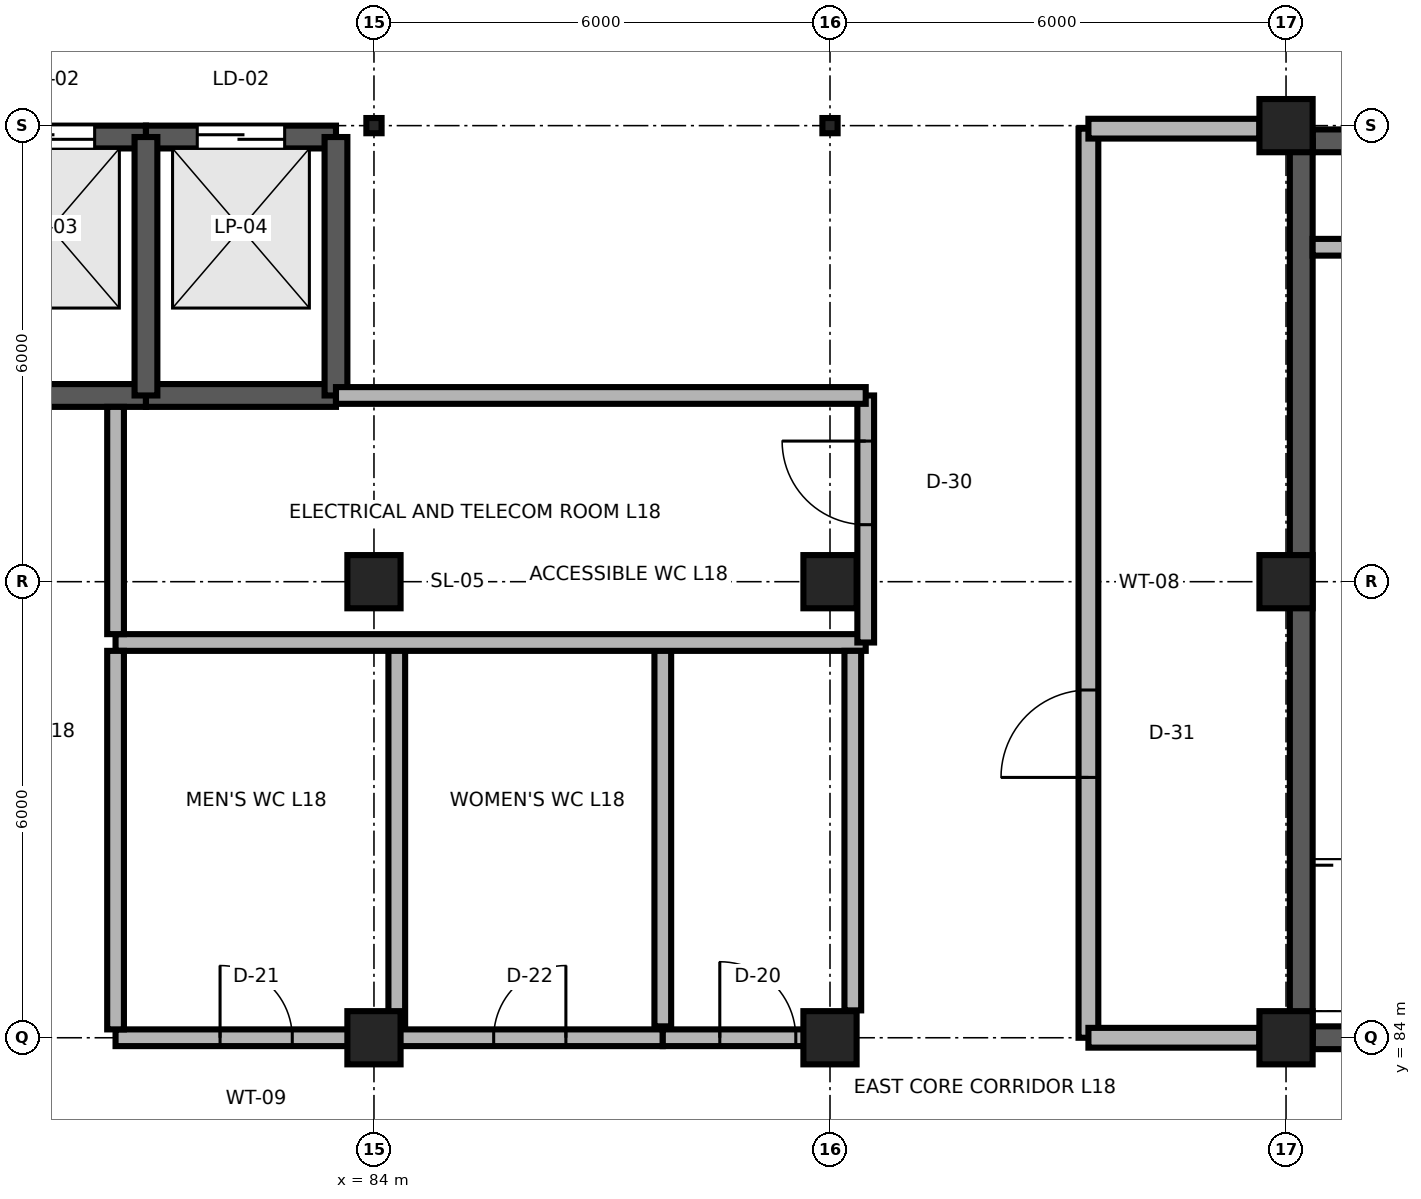
"""IFC4 building model, lengths in metres.
Left out: names, types, materials, properties, quantities, classifications, styles, units other than length and angle.
Written with IfcOpenShell. Run it as: python <this file> out.ifc"""

import sys

from ifc_helpers import new_model, si_unit, direction, frame, frame_2d, origin, origin_2d, place, context, subcontext, project, spatial, rectangle, i_section, extrude, element, fill, save


model = new_model("IFC4")
c1 = context("Model", 3, precision=1e-05, world=origin(), true_north=direction((0.0, 1.0)))
c2 = subcontext(c1, "Body", "Model", "MODEL_VIEW")
j1 = project(units=[si_unit("LENGTHUNIT", "METRE"), si_unit("PLANEANGLEUNIT", "RADIAN")], contexts=[c1])
p1 = place(None, origin())
s1 = spatial("IfcSite", under=j1, at=p1, CompositionType="ELEMENT")
p2 = place(p1, origin())
s2 = spatial("IfcBuilding", under=s1, at=p2, CompositionType="ELEMENT")
p3 = place(p2, frame((0.0, 0.0, 72.0)))
s3 = spatial("IfcBuildingStorey", under=s2, at=p3, CompositionType="ELEMENT", Elevation=72.0)
for number, where, z_axis, x_axis in (
    (1, (84.0, 84.0, 0.0), (0.0, 0.0, 1.0), (1.0, 0.0, 0.0)),
    (2, (90.0, 84.0, 0.0), (0.0, 0.0, 1.0), (1.0, 0.0, 0.0)),
    (3, (96.0, 84.0, 0.0), (0.0, 0.0, 1.0), (1.0, 0.0, 0.0)),
    (4, (84.0, 90.0, 0.0), (0.0, 0.0, 1.0), (1.0, 0.0, 0.0)),
    (5, (90.0, 90.0, 0.0), (0.0, 0.0, 1.0), (1.0, 0.0, 0.0)),
    (6, (96.0, 90.0, 0.0), (0.0, 0.0, 1.0), (1.0, 0.0, 0.0)),
):
    element("IfcColumn", number, at=place(p3, frame(where, z_axis=z_axis, x_axis=x_axis)), inside=s3, PredefinedType="COLUMN", context=c2, shape_type="SweptSolid", body=[
        extrude(rectangle(XDim=0.7, YDim=0.7, at=origin_2d()), origin(), (0.0, 0.0, 1.0), 4.3),
    ])
for number, where, z_axis, x_axis in (
    (7, (84.0, 96.0, 0.0), (0.0, 0.0, 1.0), (1.0, 0.0, 0.0)),
    (8, (90.0, 96.0, 0.0), (0.0, 0.0, 1.0), (1.0, 0.0, 0.0)),
):
    element("IfcColumn", number, at=place(p3, frame(where, z_axis=z_axis, x_axis=x_axis)), inside=s3, PredefinedType="COLUMN", context=c2, shape_type="SweptSolid", body=[
        extrude(i_section(OverallWidth=0.2, OverallDepth=0.2, WebThickness=0.008, FlangeThickness=0.012, FilletRadius=0.013, at=origin_2d()), origin(), (0.0, 0.0, 1.0), 4.3),
    ])
p4 = place(p3, frame((96.0, 96.0, 0.0), z_axis=(0.0, 0.0, 1.0), x_axis=(1.0, 0.0, 0.0)))
e9 = element("IfcColumn", 9, at=p4, inside=s3, PredefinedType="COLUMN", context=c2, shape_type="SweptSolid", body=[
    extrude(rectangle(XDim=0.7, YDim=0.7, at=origin_2d()), origin(), (0.0, 0.0, 1.0), 4.3),
])
p5 = place(p3, frame((96.35, 84.0, 0.0), z_axis=(0.0, 0.0, 1.0), x_axis=(1.0, 0.0, 0.0)))
e10 = element("IfcWall", 10, at=p5, inside=s3, PredefinedType="SHEAR", context=c2, shape_type="SweptSolid", body=[
    extrude(rectangle(XDim=5.3, YDim=0.3, at=frame_2d((2.65, 0.0))), origin(), (0.0, 0.0, 1.0), 4.3),
])
p6 = place(p5, frame((1.975, 0.0, 0.0)))
e11 = element("IfcOpeningElement", 11, at=p6, cuts=e10, PredefinedType="OPENING", context=c2, shape_type="SweptSolid", body=[
    extrude(rectangle(XDim=1.35, YDim=2.2, at=frame_2d((0.675, 1.1))), frame((0.0, 0.165, 0.0), z_axis=(0.0, -1.0, 0.0), x_axis=(1.0, 0.0, 0.0)), (0.0, 0.0, 1.0), 0.33),
])
p7 = place(p3, frame((96.35, 95.8, 0.0), z_axis=(0.0, 0.0, 1.0), x_axis=(1.0, 0.0, 0.0)))
e12 = element("IfcWall", 12, at=p7, inside=s3, PredefinedType="SHEAR", context=c2, shape_type="SweptSolid", body=[
    extrude(rectangle(XDim=5.3, YDim=0.3, at=frame_2d((2.65, 0.0))), origin(), (0.0, 0.0, 1.0), 4.3),
])
p8 = place(p3, frame((96.2, 84.0, 0.0), z_axis=(0.0, 0.0, 1.0), x_axis=(0.0, 1.0, 0.0)))
e13 = element("IfcWall", 13, at=p8, inside=s3, PredefinedType="SHEAR", context=c2, shape_type="SweptSolid", body=[
    extrude(rectangle(XDim=11.8, YDim=0.3, at=frame_2d((5.9, 0.0))), origin(), (0.0, 0.0, 1.0), 4.3),
])
p9 = place(p3, frame((96.35, 94.4, 0.0), z_axis=(0.0, 0.0, 1.0), x_axis=(1.0, 0.0, 0.0)))
e14 = element("IfcWall", 14, at=p9, inside=s3, PredefinedType="PARTITIONING", context=c2, shape_type="SweptSolid", body=[
    extrude(rectangle(XDim=1.1, YDim=0.22, at=frame_2d((0.55, 0.0))), origin(), (0.0, 0.0, 1.0), 4.3),
])
p10 = place(p3, frame((78.5, 95.85, 0.0), z_axis=(0.0, 0.0, 1.0), x_axis=(1.0, 0.0, 0.0)))
e15 = element("IfcWall", 15, at=p10, inside=s3, PredefinedType="SHEAR", context=c2, shape_type="SweptSolid", body=[
    extrude(rectangle(XDim=2.5, YDim=0.3, at=frame_2d((1.25, 0.0))), origin(), (0.0, 0.0, 1.0), 4.3),
])
p11 = place(p10, frame((0.675, 0.0, 0.0)))
e16 = element("IfcOpeningElement", 16, at=p11, cuts=e15, PredefinedType="OPENING", context=c2, shape_type="SweptSolid", body=[
    extrude(rectangle(XDim=1.15, YDim=2.15, at=frame_2d((0.575, 1.075))), frame((0.0, 0.165, 0.0), z_axis=(0.0, -1.0, 0.0), x_axis=(1.0, 0.0, 0.0)), (0.0, 0.0, 1.0), 0.33),
])
p12 = place(p3, frame((78.5, 92.45, 0.0), z_axis=(0.0, 0.0, 1.0), x_axis=(1.0, 0.0, 0.0)))
e17 = element("IfcWall", 17, at=p12, inside=s3, PredefinedType="SHEAR", context=c2, shape_type="SweptSolid", body=[
    extrude(rectangle(XDim=2.5, YDim=0.3, at=frame_2d((1.25, 0.0))), origin(), (0.0, 0.0, 1.0), 4.3),
])
p13 = place(p3, frame((81.0, 95.85, 0.0), z_axis=(0.0, 0.0, 1.0), x_axis=(1.0, 0.0, 0.0)))
e18 = element("IfcWall", 18, at=p13, inside=s3, PredefinedType="SHEAR", context=c2, shape_type="SweptSolid", body=[
    extrude(rectangle(XDim=2.5, YDim=0.3, at=frame_2d((1.25, 0.0))), origin(), (0.0, 0.0, 1.0), 4.3),
])
p14 = place(p13, frame((0.675, 0.0, 0.0)))
e19 = element("IfcOpeningElement", 19, at=p14, cuts=e18, PredefinedType="OPENING", context=c2, shape_type="SweptSolid", body=[
    extrude(rectangle(XDim=1.15, YDim=2.15, at=frame_2d((0.575, 1.075))), frame((0.0, 0.165, 0.0), z_axis=(0.0, -1.0, 0.0), x_axis=(1.0, 0.0, 0.0)), (0.0, 0.0, 1.0), 0.33),
])
p15 = place(p3, frame((81.0, 92.45, 0.0), z_axis=(0.0, 0.0, 1.0), x_axis=(1.0, 0.0, 0.0)))
e20 = element("IfcWall", 20, at=p15, inside=s3, PredefinedType="SHEAR", context=c2, shape_type="SweptSolid", body=[
    extrude(rectangle(XDim=2.5, YDim=0.3, at=frame_2d((1.25, 0.0))), origin(), (0.0, 0.0, 1.0), 4.3),
])
for number, where, z_axis, x_axis in (
    (21, (81.0, 92.45, 0.0), (0.0, 0.0, 1.0), (0.0, 1.0, 0.0)),
    (22, (83.5, 92.45, 0.0), (0.0, 0.0, 1.0), (0.0, 1.0, 0.0)),
):
    element("IfcWall", number, at=place(p3, frame(where, z_axis=z_axis, x_axis=x_axis)), inside=s3, PredefinedType="SHEAR", context=c2, shape_type="SweptSolid", body=[
        extrude(rectangle(XDim=3.4, YDim=0.3, at=frame_2d((1.7, 0.0))), origin(), (0.0, 0.0, 1.0), 4.3),
    ])
p16 = place(p3, frame((93.4, 84.0, 0.0), z_axis=(0.0, 0.0, 1.0), x_axis=(0.0, 1.0, 0.0)))
e23 = element("IfcWall", 23, at=p16, inside=s3, PredefinedType="PARTITIONING", context=c2, shape_type="SweptSolid", body=[
    extrude(rectangle(XDim=11.96, YDim=0.26, at=frame_2d((5.98, 0.0))), origin(), (0.0, 0.0, 1.0), 4.3),
])
p17 = place(p16, frame((3.425, 0.0, 0.0)))
e24 = element("IfcOpeningElement", 24, at=p17, cuts=e23, PredefinedType="OPENING", context=c2, shape_type="SweptSolid", body=[
    extrude(rectangle(XDim=1.15, YDim=2.2, at=frame_2d((0.575, 1.1))), frame((0.0, 0.145, 0.0), z_axis=(0.0, -1.0, 0.0), x_axis=(1.0, 0.0, 0.0)), (0.0, 0.0, 1.0), 0.29),
])
for number, where, z_axis, x_axis in (
    (25, (93.4, 84.0, 0.0), (0.0, 0.0, 1.0), (1.0, 0.0, 0.0)),
    (26, (93.4, 95.96, 0.0), (0.0, 0.0, 1.0), (1.0, 0.0, 0.0)),
):
    element("IfcWall", number, at=place(p3, frame(where, z_axis=z_axis, x_axis=x_axis)), inside=s3, PredefinedType="PARTITIONING", context=c2, shape_type="SweptSolid", body=[
        extrude(rectangle(XDim=2.25, YDim=0.26, at=frame_2d((1.125, 0.0))), origin(), (0.0, 0.0, 1.0), 4.056),
    ])
p18 = place(p3, frame((80.6, 84.0, 0.0), z_axis=(0.0, 0.0, 1.0), x_axis=(1.0, 0.0, 0.0)))
e27 = element("IfcWall", 27, at=p18, inside=s3, PredefinedType="PARTITIONING", context=c2, shape_type="SweptSolid", body=[
    extrude(rectangle(XDim=3.7, YDim=0.22, at=frame_2d((1.85, 0.0))), origin(), (0.0, 0.0, 1.0), 4.056),
])
p19 = place(p18, frame((1.375, 0.0, 0.0)))
e28 = element("IfcOpeningElement", 28, at=p19, cuts=e27, PredefinedType="OPENING", context=c2, shape_type="SweptSolid", body=[
    extrude(rectangle(XDim=0.95, YDim=2.15, at=frame_2d((0.475, 1.075))), frame((0.0, 0.125, 0.0), z_axis=(0.0, -1.0, 0.0), x_axis=(1.0, 0.0, 0.0)), (0.0, 0.0, 1.0), 0.25),
])
p20 = place(p3, frame((84.3, 84.0, 0.0), z_axis=(0.0, 0.0, 1.0), x_axis=(1.0, 0.0, 0.0)))
e29 = element("IfcWall", 29, at=p20, inside=s3, PredefinedType="PARTITIONING", context=c2, shape_type="SweptSolid", body=[
    extrude(rectangle(XDim=3.5, YDim=0.22, at=frame_2d((1.75, 0.0))), origin(), (0.0, 0.0, 1.0), 4.056),
])
p21 = place(p20, frame((1.275, 0.0, 0.0)))
e30 = element("IfcOpeningElement", 30, at=p21, cuts=e29, PredefinedType="OPENING", context=c2, shape_type="SweptSolid", body=[
    extrude(rectangle(XDim=0.95, YDim=2.1, at=frame_2d((0.475, 1.05))), frame((0.0, 0.125, 0.0), z_axis=(0.0, -1.0, 0.0), x_axis=(1.0, 0.0, 0.0)), (0.0, 0.0, 1.0), 0.25),
])
p22 = place(p3, frame((87.8, 84.0, 0.0), z_axis=(0.0, 0.0, 1.0), x_axis=(1.0, 0.0, 0.0)))
e31 = element("IfcWall", 31, at=p22, inside=s3, PredefinedType="PARTITIONING", context=c2, shape_type="SweptSolid", body=[
    extrude(rectangle(XDim=2.5, YDim=0.22, at=frame_2d((1.25, 0.0))), origin(), (0.0, 0.0, 1.0), 4.056),
])
p23 = place(p22, frame((0.75, 0.0, 0.0)))
e32 = element("IfcOpeningElement", 32, at=p23, cuts=e31, PredefinedType="OPENING", context=c2, shape_type="SweptSolid", body=[
    extrude(rectangle(XDim=1.0, YDim=2.15, at=frame_2d((0.5, 1.075))), frame((0.0, 0.125, 0.0), z_axis=(0.0, -1.0, 0.0), x_axis=(1.0, 0.0, 0.0)), (0.0, 0.0, 1.0), 0.25),
])
for number, where, z_axis, x_axis in (
    (33, (84.3, 84.15, 0.0), (0.0, 0.0, 1.0), (0.0, 1.0, 0.0)),
    (34, (87.8, 84.15, 0.0), (0.0, 0.0, 1.0), (0.0, 1.0, 0.0)),
):
    element("IfcWall", number, at=place(p3, frame(where, z_axis=z_axis, x_axis=x_axis)), inside=s3, PredefinedType="PARTITIONING", context=c2, shape_type="SweptSolid", body=[
        extrude(rectangle(XDim=5.0, YDim=0.22, at=frame_2d((2.5, 0.0))), origin(), (0.0, 0.0, 1.0), 4.3),
    ])
p24 = place(p3, frame((80.6, 89.2, 0.0), z_axis=(0.0, 0.0, 1.0), x_axis=(1.0, 0.0, 0.0)))
e35 = element("IfcWall", 35, at=p24, inside=s3, PredefinedType="PARTITIONING", context=c2, shape_type="SweptSolid", body=[
    extrude(rectangle(XDim=9.87, YDim=0.22, at=frame_2d((4.935, 0.0))), origin(), (0.0, 0.0, 1.0), 4.3),
])
p25 = place(p3, frame((90.47, 89.2, 0.0), z_axis=(0.0, 0.0, 1.0), x_axis=(0.0, 1.0, 0.0)))
e36 = element("IfcWall", 36, at=p25, inside=s3, PredefinedType="PARTITIONING", context=c2, shape_type="SweptSolid", body=[
    extrude(rectangle(XDim=3.25, YDim=0.22, at=frame_2d((1.625, 0.0))), origin(), (0.0, 0.0, 1.0), 4.3),
])
p26 = place(p25, frame((1.55, 0.0, 0.0)))
e37 = element("IfcOpeningElement", 37, at=p26, cuts=e36, PredefinedType="OPENING", context=c2, shape_type="SweptSolid", body=[
    extrude(rectangle(XDim=1.1, YDim=2.15, at=frame_2d((0.55, 1.075))), frame((0.0, 0.125, 0.0), z_axis=(0.0, -1.0, 0.0), x_axis=(1.0, 0.0, 0.0)), (0.0, 0.0, 1.0), 0.25),
])
p27 = place(p3, frame((80.6, 84.11, 0.0), z_axis=(0.0, 0.0, 1.0), x_axis=(0.0, 1.0, 0.0)))
e38 = element("IfcWall", 38, at=p27, inside=s3, PredefinedType="PARTITIONING", context=c2, shape_type="SweptSolid", body=[
    extrude(rectangle(XDim=4.98, YDim=0.22, at=frame_2d((2.49, 0.0))), origin(), (0.0, 0.0, 1.0), 4.3),
])
p28 = place(p3, frame((90.3, 84.36, 0.0), z_axis=(0.0, 0.0, 1.0), x_axis=(0.0, 1.0, 0.0)))
e39 = element("IfcWall", 39, at=p28, inside=s3, PredefinedType="PARTITIONING", context=c2, shape_type="SweptSolid", body=[
    extrude(rectangle(XDim=4.73, YDim=0.22, at=frame_2d((2.365, 0.0))), origin(), (0.0, 0.0, 1.0), 4.3),
])
p29 = place(p3, frame((80.6, 89.31, 0.0), z_axis=(0.0, 0.0, 1.0), x_axis=(0.0, 1.0, 0.0)))
e40 = element("IfcWall", 40, at=p29, inside=s3, PredefinedType="PARTITIONING", context=c2, shape_type="SweptSolid", body=[
    extrude(rectangle(XDim=2.99, YDim=0.22, at=frame_2d((1.495, 0.0))), origin(), (0.0, 0.0, 1.0), 4.3),
])
p30 = place(p3, frame((83.5, 92.45, 0.0), z_axis=(0.0, 0.0, 1.0), x_axis=(1.0, 0.0, 0.0)))
e41 = element("IfcWall", 41, at=p30, inside=s3, PredefinedType="PARTITIONING", context=c2, shape_type="SweptSolid", body=[
    extrude(rectangle(XDim=6.97, YDim=0.22, at=frame_2d((3.485, 0.0))), origin(), (0.0, 0.0, 1.0), 4.3),
])
p31 = place(p11, origin())
e42 = element("IfcDoor", 42, at=p31, inside=s3, OperationType="DOUBLE_DOOR_SLIDING", PredefinedType="DOOR", context=c2, shape_type="SweptSolid", body=[
    extrude(rectangle(XDim=1.15, YDim=2.15, at=frame_2d((0.575, 1.075))), frame((0.0, 0.025, 0.0), z_axis=(0.0, -1.0, 0.0), x_axis=(1.0, 0.0, 0.0)), (0.0, 0.0, 1.0), 0.05),
])
fill(e16, e42)
p32 = place(p14, origin())
e43 = element("IfcDoor", 43, at=p32, inside=s3, OperationType="DOUBLE_DOOR_SLIDING", PredefinedType="DOOR", context=c2, shape_type="SweptSolid", body=[
    extrude(rectangle(XDim=1.15, YDim=2.15, at=frame_2d((0.575, 1.075))), frame((0.0, 0.025, 0.0), z_axis=(0.0, -1.0, 0.0), x_axis=(1.0, 0.0, 0.0)), (0.0, 0.0, 1.0), 0.05),
])
fill(e19, e43)
p33 = place(p17, origin())
e44 = element("IfcDoor", 44, at=p33, inside=s3, OperationType="SINGLE_SWING_LEFT", PredefinedType="DOOR", context=c2, shape_type="SweptSolid", body=[
    extrude(rectangle(XDim=1.15, YDim=2.2, at=frame_2d((0.575, 1.1))), frame((0.0, 0.025, 0.0), z_axis=(0.0, -1.0, 0.0), x_axis=(1.0, 0.0, 0.0)), (0.0, 0.0, 1.0), 0.05),
])
fill(e24, e44)
p34 = place(p19, origin())
e45 = element("IfcDoor", 45, at=p34, inside=s3, OperationType="SINGLE_SWING_LEFT", PredefinedType="DOOR", context=c2, shape_type="SweptSolid", body=[
    extrude(rectangle(XDim=0.95, YDim=2.15, at=frame_2d((0.475, 1.075))), frame((0.0, 0.025, 0.0), z_axis=(0.0, -1.0, 0.0), x_axis=(1.0, 0.0, 0.0)), (0.0, 0.0, 1.0), 0.05),
])
fill(e28, e45)
p35 = place(p21, origin())
e46 = element("IfcDoor", 46, at=p35, inside=s3, OperationType="SINGLE_SWING_RIGHT", PredefinedType="DOOR", context=c2, shape_type="SweptSolid", body=[
    extrude(rectangle(XDim=0.95, YDim=2.1, at=frame_2d((0.475, 1.05))), frame((0.0, 0.025, 0.0), z_axis=(0.0, -1.0, 0.0), x_axis=(1.0, 0.0, 0.0)), (0.0, 0.0, 1.0), 0.05),
])
fill(e30, e46)
p36 = place(p23, origin())
e47 = element("IfcDoor", 47, at=p36, inside=s3, OperationType="SINGLE_SWING_LEFT", PredefinedType="DOOR", context=c2, shape_type="SweptSolid", body=[
    extrude(rectangle(XDim=1.0, YDim=2.15, at=frame_2d((0.5, 1.075))), frame((0.0, 0.025, 0.0), z_axis=(0.0, -1.0, 0.0), x_axis=(1.0, 0.0, 0.0)), (0.0, 0.0, 1.0), 0.05),
])
fill(e32, e47)
p37 = place(p26, origin())
e48 = element("IfcDoor", 48, at=p37, inside=s3, OperationType="SINGLE_SWING_RIGHT", PredefinedType="DOOR", context=c2, shape_type="SweptSolid", body=[
    extrude(rectangle(XDim=1.1, YDim=2.15, at=frame_2d((0.55, 1.075))), frame((0.0, 0.025, 0.0), z_axis=(0.0, -1.0, 0.0), x_axis=(1.0, 0.0, 0.0)), (0.0, 0.0, 1.0), 0.05),
])
fill(e37, e48)
save(model, sys.argv[1])
